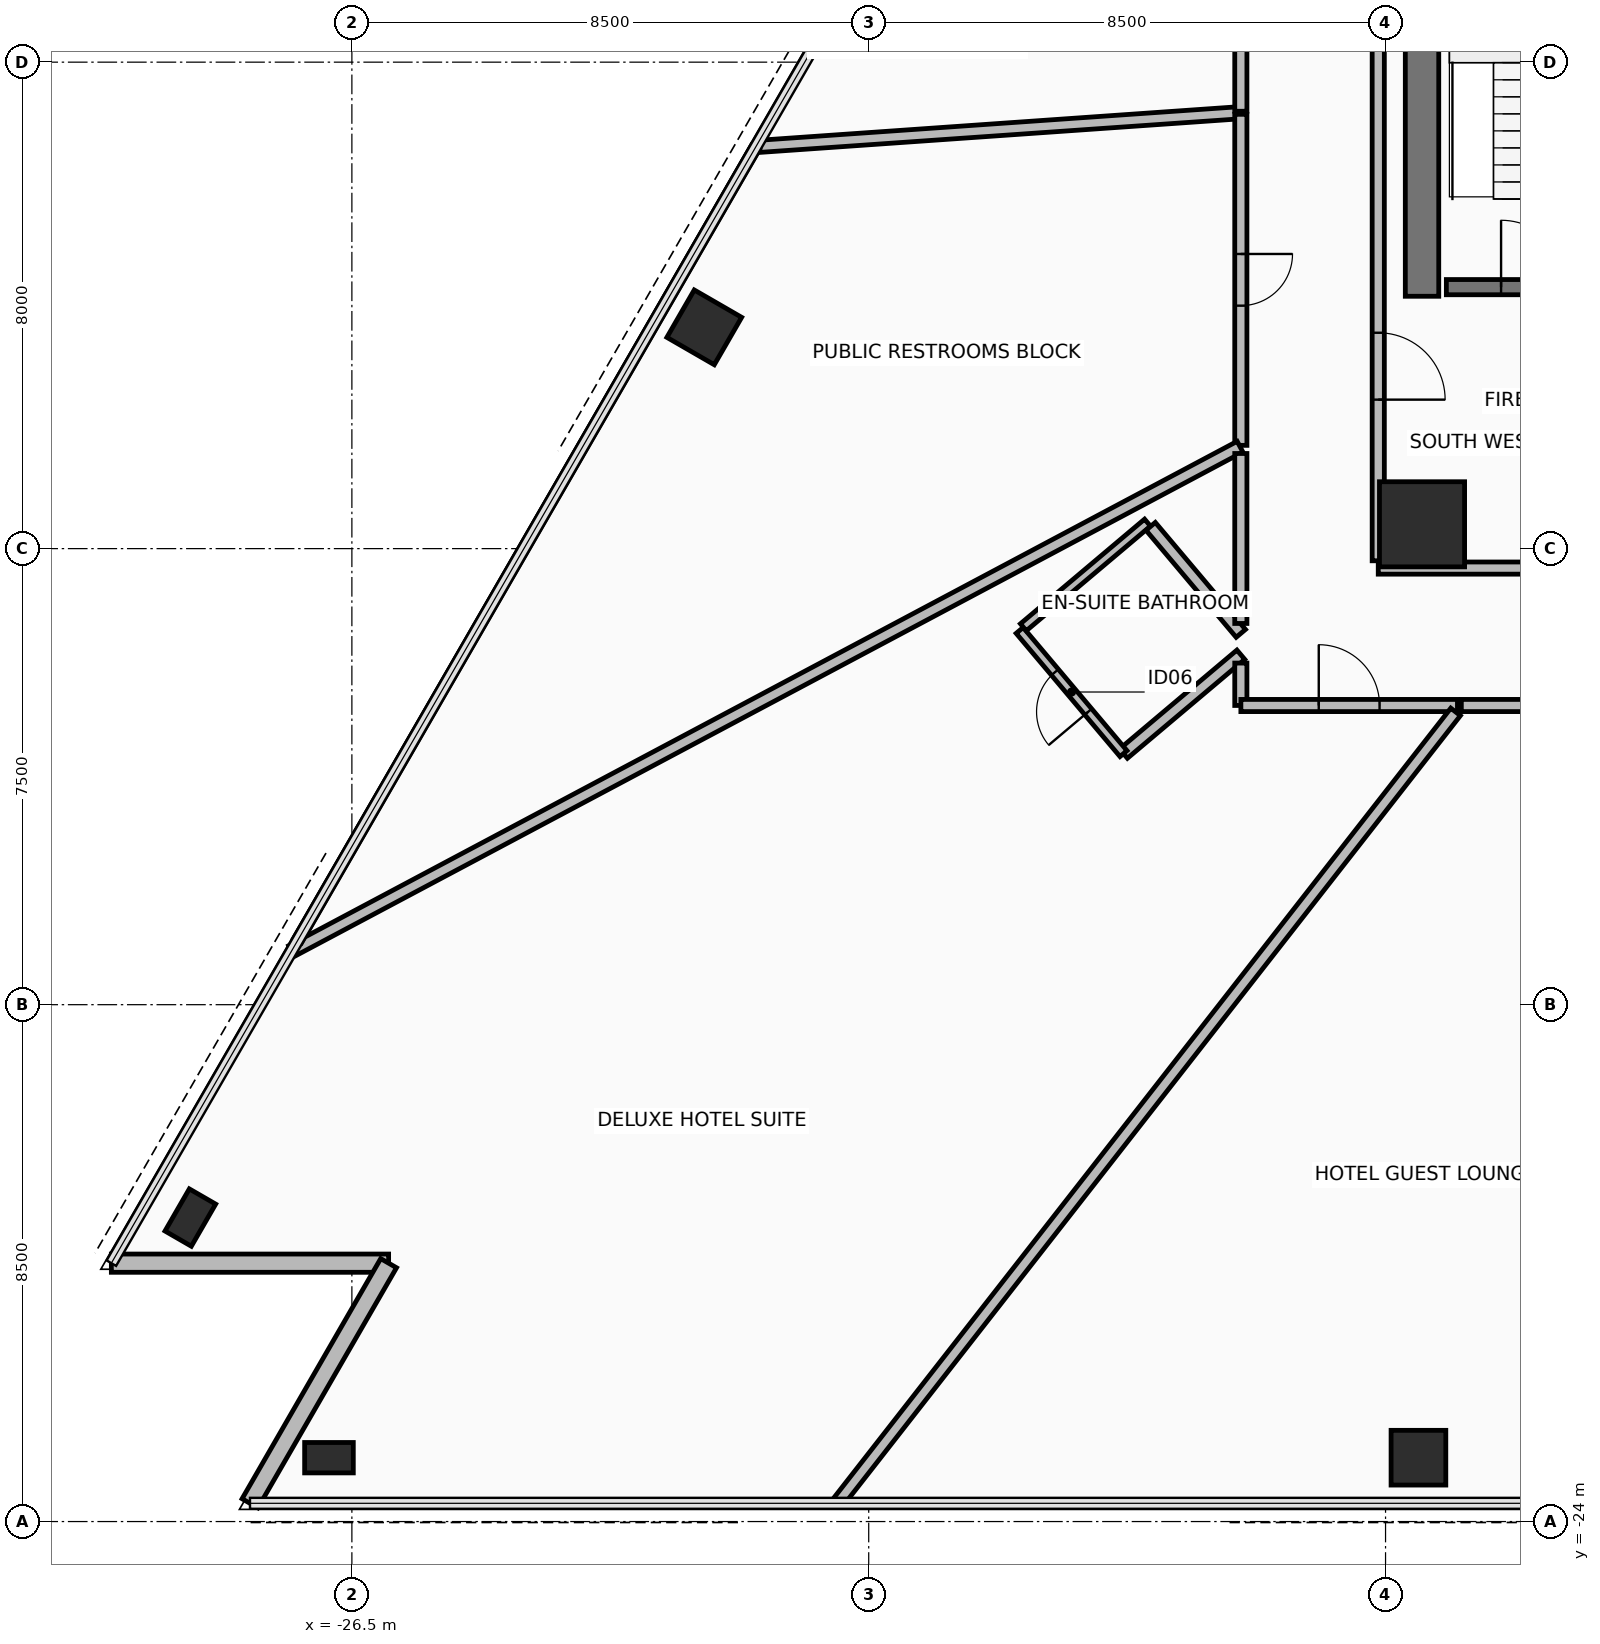
"""IFC4 building model, lengths in metres.
Left out: names, types, materials, properties, quantities, classifications, styles, units other than length and angle.
Written with IfcOpenShell. Run it as: python <this file> out.ifc"""

import sys

from ifc_helpers import new_model, si_unit, direction, frame, frame_2d, origin, origin_2d, place, context, subcontext, project, spatial, rectangle, hollow_rectangle, extrude, element, fill, save


model = new_model("IFC4")
c1 = context("Model", 3, precision=1e-05, world=origin(), true_north=direction((0.0, 1.0)))
c2 = subcontext(c1, "Body", "Model", "MODEL_VIEW")
j1 = project(units=[si_unit("LENGTHUNIT", "METRE"), si_unit("PLANEANGLEUNIT", "RADIAN")], contexts=[c1])
p1 = place(None, origin())
s1 = spatial("IfcSite", under=j1, at=p1, CompositionType="ELEMENT")
p2 = place(p1, origin())
s2 = spatial("IfcBuilding", under=s1, at=p2, CompositionType="ELEMENT")
p3 = place(p2, frame((0.0, 0.0, 45.45)))
s3 = spatial("IfcBuildingStorey", under=s2, at=p3, CompositionType="ELEMENT", Elevation=45.45)
p4 = place(p3, frame((-8.9, -7.6, 0.0), z_axis=(0.0, 0.0, 1.0), x_axis=(1.0, 0.0, 0.0)))
e1 = element("IfcColumn", 1, at=p4, inside=s3, PredefinedType="COLUMN", context=c2, shape_type="SweptSolid", body=[
    extrude(rectangle(XDim=1.4, YDim=1.4, at=origin_2d()), origin(), (0.0, 0.0, 1.0), 3.4),
])
p5 = place(p3, frame((-20.705, -4.361, 0.0), z_axis=(0.0, 0.0, 1.0), x_axis=(0.500001511499, 0.866024531118, 0.0)))
e2 = element("IfcColumn", 2, at=p5, inside=s3, PredefinedType="COLUMN", context=c2, shape_type="SweptSolid", body=[
    extrude(hollow_rectangle(XDim=0.9, YDim=0.9, WallThickness=0.05, at=origin_2d()), origin(), (0.0, 0.0, 1.0), 3.4),
])
for number, where, z_axis, x_axis in (
    (3, (-29.157, -19.001, 0.0), (0.0, 0.0, 1.0), (0.5, 0.866, 0.0)),
    (4, (-26.877, -22.95, 0.0), (0.0, 0.0, 1.0), (1.0, 0.0, 0.0)),
):
    element("IfcColumn", number, at=place(p3, frame(where, z_axis=z_axis, x_axis=x_axis)), inside=s3, PredefinedType="COLUMN", context=c2, shape_type="SweptSolid", body=[
        extrude(hollow_rectangle(XDim=0.5, YDim=0.8, WallThickness=0.04, at=origin_2d()), origin(), (0.0, 0.0, 1.0), 3.4),
    ])
p6 = place(p3, frame((-8.959, -22.95, 0.0), z_axis=(0.0, 0.0, 1.0), x_axis=(1.0, 0.0, 0.0)))
e5 = element("IfcColumn", 5, at=p6, inside=s3, PredefinedType="COLUMN", context=c2, shape_type="SweptSolid", body=[
    extrude(hollow_rectangle(XDim=0.9, YDim=0.9, WallThickness=0.05, at=origin_2d()), origin(), (0.0, 0.0, 1.0), 3.4),
])
p7 = place(p3, frame((-30.456, -19.751, 0.0), z_axis=(0.0, 0.0, 1.0), x_axis=(1.0, 0.0, 0.0)))
e6 = element("IfcWall", 6, at=p7, inside=s3, PredefinedType="STANDARD", context=c2, shape_type="SweptSolid", body=[
    extrude(rectangle(XDim=4.56, YDim=0.3, at=frame_2d((2.28, 0.0))), origin(), (0.0, 0.0, 1.0), 2.42),
])
p8 = place(p3, frame((-25.896, -19.751, 0.0), z_axis=(0.0, 0.0, 1.0), x_axis=(-0.500014431597, -0.866017071537, 0.0)))
e7 = element("IfcWall", 7, at=p8, inside=s3, PredefinedType="STANDARD", context=c2, shape_type="SweptSolid", body=[
    extrude(rectangle(XDim=4.56, YDim=0.3, at=frame_2d((2.28, 0.0))), origin(), (0.0, 0.0, 1.0), 2.42),
])
p9 = place(p3, frame((-8.9, -3.85, 0.0), z_axis=(0.0, 0.0, 1.0), x_axis=(0.0, 1.0, 0.0)))
e8 = element("IfcWall", 8, at=p9, inside=s3, PredefinedType="SHEAR", context=c2, shape_type="SweptSolid", body=[
    extrude(rectangle(XDim=10.7, YDim=0.55, at=frame_2d((5.35, 0.0))), origin(), (0.0, 0.0, 1.0), 3.225),
])
p10 = place(p3, frame((-9.62, -8.32, 0.0), z_axis=(0.0, 0.0, 1.0), x_axis=(1.0, 0.0, 0.0)))
e9 = element("IfcWall", 9, at=p10, inside=s3, PredefinedType="PARTITIONING", context=c2, shape_type="SweptSolid", body=[
    extrude(rectangle(XDim=19.24, YDim=0.2, at=frame_2d((9.62, 0.0))), origin(), (0.0, 0.0, 1.0), 2.62),
])
p11 = place(p3, frame((-9.62, 8.2, 0.0), z_axis=(0.0, 0.0, 1.0), x_axis=(0.0, -1.0, 0.0)))
e10 = element("IfcWall", 10, at=p11, inside=s3, PredefinedType="PARTITIONING", context=c2, shape_type="SweptSolid", body=[
    extrude(rectangle(XDim=16.4, YDim=0.2, at=frame_2d((8.2, 0.0))), origin(), (0.0, 0.0, 1.0), 2.62),
])
p12 = place(p11, frame((12.65, 0.0, 0.0)))
e11 = element("IfcOpeningElement", 11, at=p12, cuts=e10, PredefinedType="OPENING", context=c2, shape_type="SweptSolid", body=[
    extrude(rectangle(XDim=1.1, YDim=2.15, at=frame_2d((0.55, 1.075))), frame((0.0, 0.11, 0.0), z_axis=(0.0, -1.0, 0.0), x_axis=(1.0, 0.0, 0.0)), (0.0, 0.0, 1.0), 0.22),
])
p13 = place(p3, frame((-8.5, -3.7, 0.0), z_axis=(0.0, 0.0, 1.0), x_axis=(1.0, 0.0, 0.0)))
e12 = element("IfcWall", 12, at=p13, inside=s3, PredefinedType="SHEAR", context=c2, shape_type="SweptSolid", body=[
    extrude(rectangle(XDim=2.95, YDim=0.25, at=frame_2d((1.475, 0.0))), origin(), (0.0, 0.0, 1.0), 3.225),
])
p14 = place(p13, frame((0.9, 0.0, 0.0)))
e13 = element("IfcOpeningElement", 13, at=p14, cuts=e12, PredefinedType="OPENING", context=c2, shape_type="SweptSolid", body=[
    extrude(rectangle(XDim=1.1, YDim=2.15, at=frame_2d((0.55, 1.075))), frame((0.0, 0.135, 0.0), z_axis=(0.0, -1.0, 0.0), x_axis=(1.0, 0.0, 0.0)), (0.0, 0.0, 1.0), 0.27),
])
p15 = place(p3, frame((-11.88, -9.745, 0.0), z_axis=(0.0, 0.0, 1.0), x_axis=(-0.764712982519, -0.644371053328, 0.0)))
e14 = element("IfcWall", 14, at=p15, inside=s3, PredefinedType="PARTITIONING", context=c2, shape_type="SweptSolid", body=[
    extrude(rectangle(XDim=2.524, YDim=0.2, at=frame_2d((1.262, 0.0))), origin(), (0.0, 0.0, 1.0), 3.225),
])
p16 = place(p3, frame((-13.81, -11.371, 0.0), z_axis=(0.0, 0.0, 1.0), x_axis=(-0.644478981733, 0.764622025647, 0.0)))
e15 = element("IfcWall", 15, at=p16, inside=s3, PredefinedType="PARTITIONING", context=c2, shape_type="SweptSolid", body=[
    extrude(rectangle(XDim=2.65, YDim=0.15, at=frame_2d((1.325, 0.0))), origin(), (0.0, 0.0, 1.0), 2.62),
])
p17 = place(p16, frame((0.9, 0.0, 0.0)))
e16 = element("IfcOpeningElement", 16, at=p17, cuts=e15, PredefinedType="OPENING", context=c2, shape_type="SweptSolid", body=[
    extrude(rectangle(XDim=0.85, YDim=2.1, at=frame_2d((0.425, 1.05))), frame((0.0, 0.085, 0.0), z_axis=(0.0, -1.0, 0.0), x_axis=(1.0, 0.0, 0.0)), (0.0, 0.0, 1.0), 0.17),
])
p18 = place(p3, frame((-15.456, -9.293, 0.0), z_axis=(0.0, 0.0, 1.0), x_axis=(0.764709608169, 0.644375057846, 0.0)))
e17 = element("IfcWall", 17, at=p18, inside=s3, PredefinedType="PARTITIONING", context=c2, shape_type="SweptSolid", body=[
    extrude(rectangle(XDim=2.67, YDim=0.15, at=frame_2d((1.335, 0.0))), origin(), (0.0, 0.0, 1.0), 3.225),
])
p19 = place(p3, frame((-13.363, -7.634, 0.0), z_axis=(0.0, 0.0, 1.0), x_axis=(0.644400290836, -0.764688345125, 0.0)))
e18 = element("IfcWall", 18, at=p19, inside=s3, PredefinedType="PARTITIONING", context=c2, shape_type="SweptSolid", body=[
    extrude(rectangle(XDim=2.302, YDim=0.2, at=frame_2d((1.151, 0.0))), origin(), (0.0, 0.0, 1.0), 2.62),
])
p20 = place(p3, frame((-19.841, -1.387, 0.0), z_axis=(0.0, 0.0, 1.0), x_axis=(0.997562942672, 0.069772311179, 0.0)))
e19 = element("IfcWall", 19, at=p20, inside=s3, PredefinedType="PARTITIONING", context=c2, shape_type="SweptSolid", body=[
    extrude(rectangle(XDim=7.953, YDim=0.2, at=frame_2d((3.977, 0.0))), origin(), (0.0, 0.0, 1.0), 2.42),
])
p21 = place(p3, frame((-11.88, -0.857, 0.0), z_axis=(0.0, 0.0, 1.0), x_axis=(0.0, -1.0, 0.0)))
e20 = element("IfcWall", 20, at=p21, inside=s3, PredefinedType="PARTITIONING", context=c2, shape_type="SweptSolid", body=[
    extrude(rectangle(XDim=5.444, YDim=0.2, at=frame_2d((2.722, 0.0))), origin(), (0.0, 0.0, 1.0), 3.225),
])
p22 = place(p21, frame((2.297, 0.0, 0.0)))
e21 = element("IfcOpeningElement", 21, at=p22, cuts=e20, PredefinedType="OPENING", context=c2, shape_type="SweptSolid", body=[
    extrude(rectangle(XDim=0.85, YDim=2.1, at=frame_2d((0.425, 1.05))), frame((0.0, 0.11, 0.0), z_axis=(0.0, -1.0, 0.0), x_axis=(1.0, 0.0, 0.0)), (0.0, 0.0, 1.0), 0.22),
])
p23 = place(p3, frame((-11.893, -6.324, 0.0), z_axis=(0.0, 0.0, 1.0), x_axis=(-0.882944790092, -0.469476833985, 0.0)))
e22 = element("IfcWall", 22, at=p23, inside=s3, PredefinedType="PARTITIONING", context=c2, shape_type="SweptSolid", body=[
    extrude(rectangle(XDim=17.667, YDim=0.2, at=frame_2d((8.833, 0.0))), origin(), (0.0, 0.0, 1.0), 2.42),
])
p24 = place(p3, frame((-27.393, -14.446, 0.0), z_axis=(0.0, 0.0, 1.0), x_axis=(0.500006761757, 0.866021499847, 0.0)))
e23 = element("IfcWall", 23, at=p24, inside=s3, PredefinedType="PARTITIONING", context=c2, shape_type="SweptSolid", body=[
    extrude(rectangle(XDim=15.065, YDim=0.15, at=frame_2d((7.532, 0.0))), origin(), (0.0, 0.0, 1.0), 3.225),
])
p25 = place(p3, frame((-11.88, 4.306, 0.0), z_axis=(0.0, 0.0, 1.0), x_axis=(0.0, -1.0, 0.0)))
e24 = element("IfcWall", 24, at=p25, inside=s3, PredefinedType="PARTITIONING", context=c2, shape_type="SweptSolid", body=[
    extrude(rectangle(XDim=5.114, YDim=0.2, at=frame_2d((2.557, 0.0))), origin(), (0.0, 0.0, 1.0), 3.225),
])
p26 = place(p25, frame((2.057, 0.0, 0.0)))
e25 = element("IfcOpeningElement", 25, at=p26, cuts=e24, PredefinedType="OPENING", context=c2, shape_type="SweptSolid", body=[
    extrude(rectangle(XDim=1.0, YDim=2.15, at=frame_2d((0.5, 1.075))), frame((0.0, 0.11, 0.0), z_axis=(0.0, -1.0, 0.0), x_axis=(1.0, 0.0, 0.0)), (0.0, 0.0, 1.0), 0.22),
])
p27 = place(p3, frame((-11.88, -6.436, 0.0), z_axis=(0.0, 0.0, 1.0), x_axis=(0.0, -1.0, 0.0)))
e26 = element("IfcWall", 26, at=p27, inside=s3, PredefinedType="PARTITIONING", context=c2, shape_type="SweptSolid", body=[
    extrude(rectangle(XDim=2.795, YDim=0.2, at=frame_2d((1.397, 0.0))), origin(), (0.0, 0.0, 1.0), 2.62),
])
p28 = place(p3, frame((-11.88, -9.882, 0.0), z_axis=(0.0, 0.0, 1.0), x_axis=(0.0, -1.0, 0.0)))
e27 = element("IfcWall", 27, at=p28, inside=s3, PredefinedType="PARTITIONING", context=c2, shape_type="SweptSolid", body=[
    extrude(rectangle(XDim=0.697, YDim=0.2, at=frame_2d((0.349, 0.0))), origin(), (0.0, 0.0, 1.0), 2.62),
])
p29 = place(p3, frame((-11.879, -10.58, 0.0), z_axis=(0.0, 0.0, 1.0), x_axis=(1.0, 0.0, 0.0)))
e28 = element("IfcWall", 28, at=p29, inside=s3, PredefinedType="PARTITIONING", context=c2, shape_type="SweptSolid", body=[
    extrude(rectangle(XDim=3.562, YDim=0.2, at=frame_2d((1.781, 0.0))), origin(), (0.0, 0.0, 1.0), 2.62),
])
p30 = place(p29, frame((1.281, 0.0, 0.0)))
e29 = element("IfcOpeningElement", 29, at=p30, cuts=e28, PredefinedType="OPENING", context=c2, shape_type="SweptSolid", body=[
    extrude(rectangle(XDim=1.0, YDim=2.15, at=frame_2d((0.5, 1.075))), frame((0.0, 0.11, 0.0), z_axis=(0.0, -1.0, 0.0), x_axis=(1.0, 0.0, 0.0)), (0.0, 0.0, 1.0), 0.22),
])
p31 = place(p3, frame((-8.348, -10.685, 0.0), z_axis=(0.0, 0.0, 1.0), x_axis=(-0.615660691561, -0.78801136595, 0.0)))
e30 = element("IfcWall", 30, at=p31, inside=s3, PredefinedType="PARTITIONING", context=c2, shape_type="SweptSolid", body=[
    extrude(rectangle(XDim=16.504, YDim=0.2, at=frame_2d((8.252, 0.0))), origin(), (0.0, 0.0, 1.0), 2.42),
])
p32 = place(p3, frame((-8.254, -10.58, 0.0), z_axis=(0.0, 0.0, 1.0), x_axis=(1.0, 0.0, 0.0)))
e31 = element("IfcWall", 31, at=p32, inside=s3, PredefinedType="PARTITIONING", context=c2, shape_type="SweptSolid", body=[
    extrude(rectangle(XDim=5.584, YDim=0.2, at=frame_2d((2.792, 0.0))), origin(), (0.0, 0.0, 1.0), 3.225),
])
p33 = place(p32, frame((2.192, 0.0, 0.0)))
e32 = element("IfcOpeningElement", 32, at=p33, cuts=e31, PredefinedType="OPENING", context=c2, shape_type="SweptSolid", body=[
    extrude(rectangle(XDim=1.2, YDim=2.15, at=frame_2d((0.6, 1.075))), frame((0.0, 0.11, 0.0), z_axis=(0.0, -1.0, 0.0), x_axis=(1.0, 0.0, 0.0)), (0.0, 0.0, 1.0), 0.22),
])
p34 = place(p12, frame((1.1, 0.0, 0.0), z_axis=(0.0, 0.0, 1.0), x_axis=(-1.0, 0.0, 0.0)))
e33 = element("IfcDoor", 33, at=p34, inside=s3, OperationType="SINGLE_SWING_LEFT", PredefinedType="DOOR", context=c2, shape_type="SweptSolid", body=[
    extrude(rectangle(XDim=1.1, YDim=2.15, at=frame_2d((0.55, 1.075))), frame((0.0, 0.025, 0.0), z_axis=(0.0, -1.0, 0.0), x_axis=(1.0, 0.0, 0.0)), (0.0, 0.0, 1.0), 0.05),
])
fill(e11, e33)
p35 = place(p14, origin())
e34 = element("IfcDoor", 34, at=p35, inside=s3, OperationType="SINGLE_SWING_LEFT", PredefinedType="DOOR", context=c2, shape_type="SweptSolid", body=[
    extrude(rectangle(XDim=1.1, YDim=2.15, at=frame_2d((0.55, 1.075))), frame((0.0, 0.025, 0.0), z_axis=(0.0, -1.0, 0.0), x_axis=(1.0, 0.0, 0.0)), (0.0, 0.0, 1.0), 0.05),
])
fill(e13, e34)
p36 = place(p17, origin())
e35 = element("IfcDoor", 35, at=p36, inside=s3, OperationType="SINGLE_SWING_RIGHT", PredefinedType="DOOR", context=c2, shape_type="SweptSolid", body=[
    extrude(rectangle(XDim=0.85, YDim=2.1, at=frame_2d((0.425, 1.05))), frame((0.0, 0.025, 0.0), z_axis=(0.0, -1.0, 0.0), x_axis=(1.0, 0.0, 0.0)), (0.0, 0.0, 1.0), 0.05),
])
fill(e16, e35)
p37 = place(p22, origin())
e36 = element("IfcDoor", 36, at=p37, inside=s3, OperationType="SINGLE_SWING_RIGHT", PredefinedType="DOOR", context=c2, shape_type="SweptSolid", body=[
    extrude(rectangle(XDim=0.85, YDim=2.1, at=frame_2d((0.425, 1.05))), frame((0.0, 0.025, 0.0), z_axis=(0.0, -1.0, 0.0), x_axis=(1.0, 0.0, 0.0)), (0.0, 0.0, 1.0), 0.05),
])
fill(e21, e36)
p38 = place(p30, origin())
e37 = element("IfcDoor", 37, at=p38, inside=s3, OperationType="SINGLE_SWING_LEFT", PredefinedType="DOOR", context=c2, shape_type="SweptSolid", body=[
    extrude(rectangle(XDim=1.0, YDim=2.15, at=frame_2d((0.5, 1.075))), frame((0.0, 0.025, 0.0), z_axis=(0.0, -1.0, 0.0), x_axis=(1.0, 0.0, 0.0)), (0.0, 0.0, 1.0), 0.05),
])
fill(e29, e37)
save(model, sys.argv[1])
